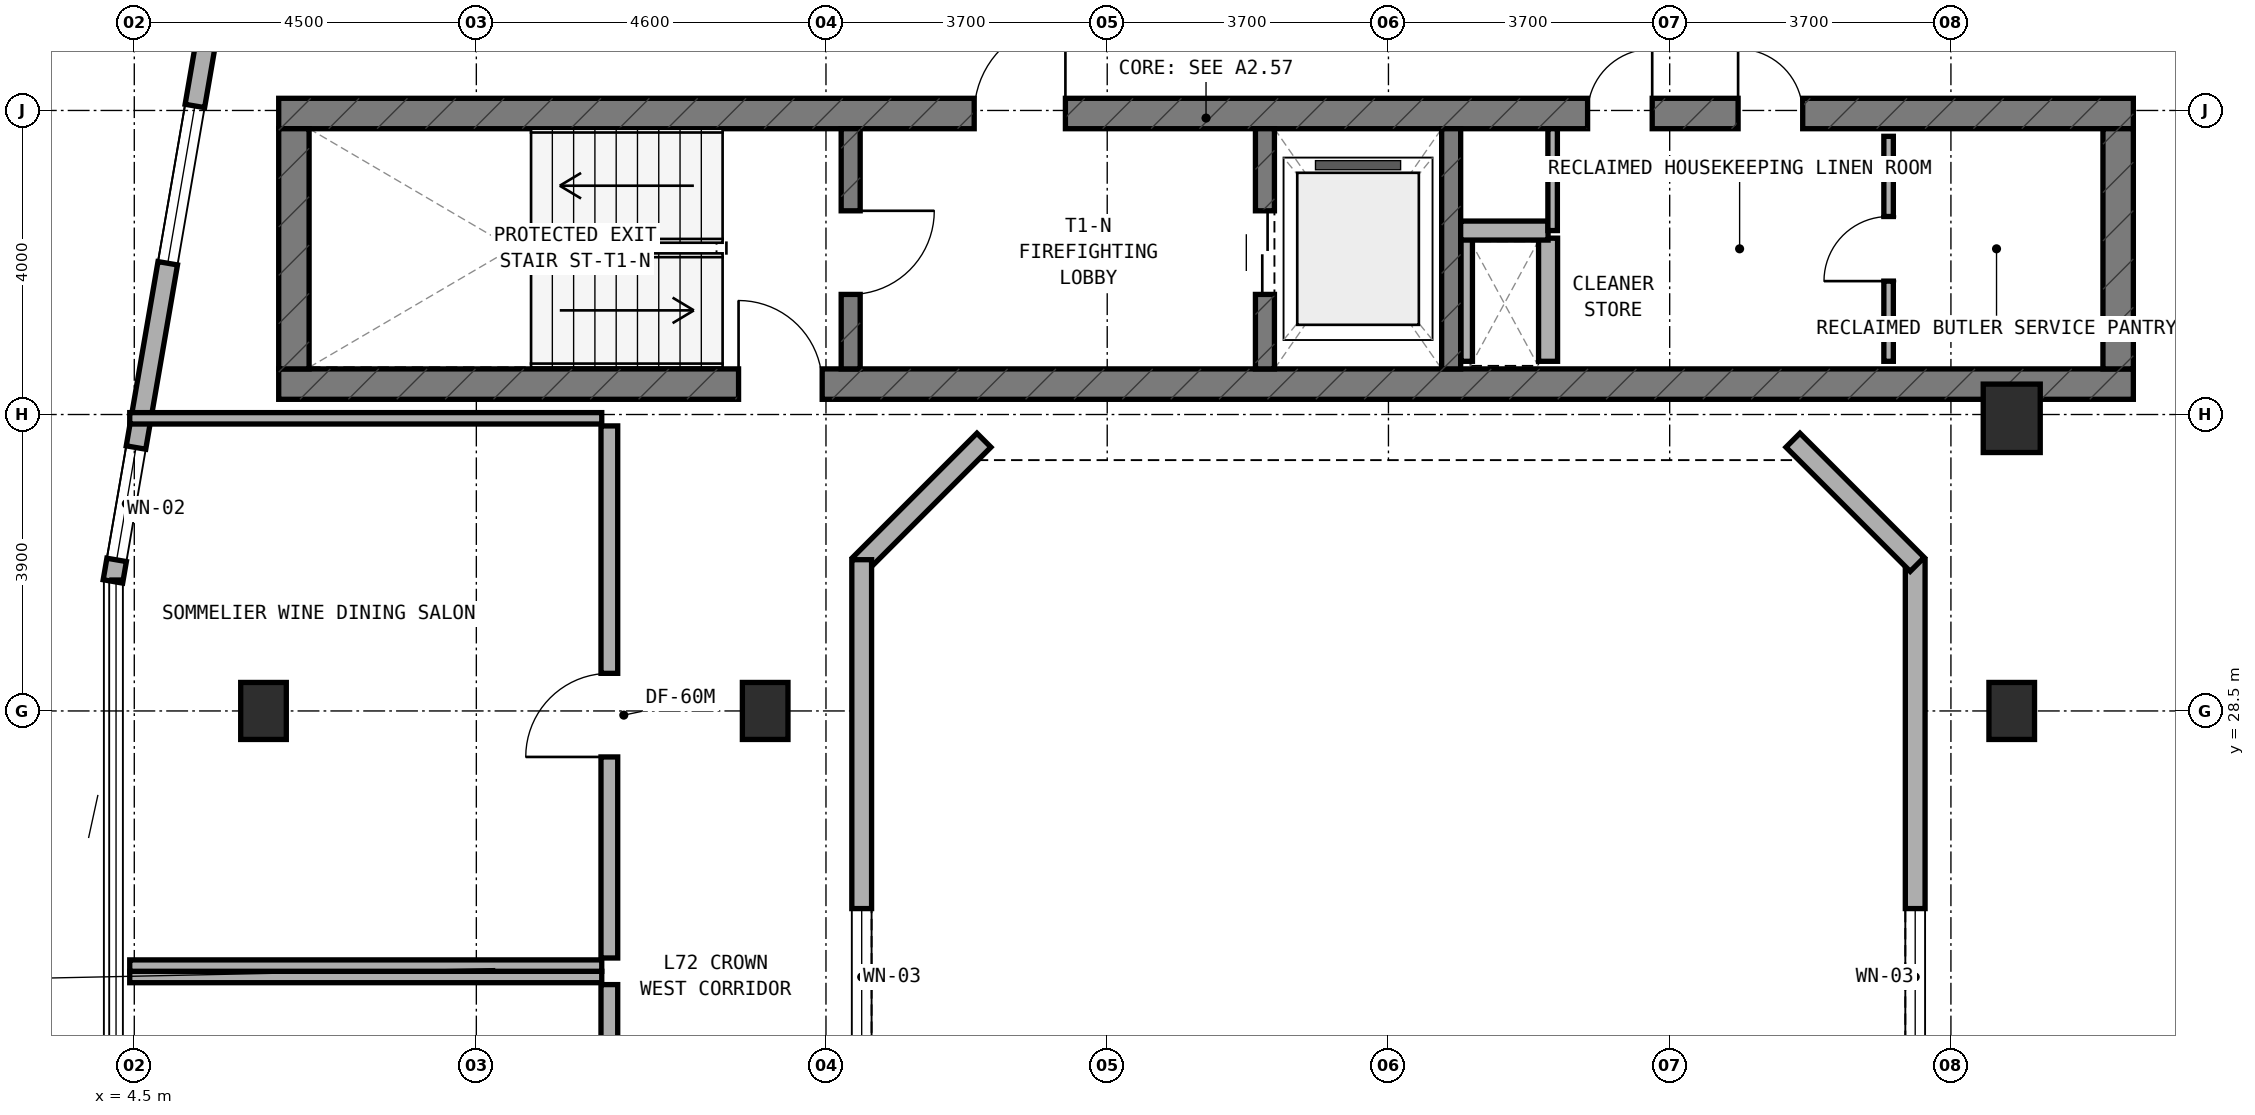
"""IFC4 building model, lengths in metres.
Left out: names, types, materials, properties, quantities, classifications, styles, units other than length and angle.
Written with IfcOpenShell. Run it as: python <this file> out.ifc"""

import sys

from ifc_helpers import new_model, si_unit, direction, frame, frame_2d, origin, origin_2d, place, context, subcontext, project, spatial, rectangle, extrude, element, fill, save


model = new_model("IFC4")
c1 = context("Model", 3, precision=1e-05, world=origin(), true_north=direction((0.0, 1.0)))
c2 = subcontext(c1, "Body", "Model", "MODEL_VIEW")
j1 = project(units=[si_unit("LENGTHUNIT", "METRE"), si_unit("PLANEANGLEUNIT", "RADIAN")], contexts=[c1])
p1 = place(None, origin())
s1 = spatial("IfcSite", under=j1, at=p1, CompositionType="ELEMENT")
p2 = place(p1, origin())
s2 = spatial("IfcBuilding", under=s1, at=p2, CompositionType="ELEMENT")
p3 = place(p2, frame((0.0, 0.0, 264.8)))
s3 = spatial("IfcBuildingStorey", under=s2, at=p3, CompositionType="ELEMENT", Elevation=264.8)
p4 = place(p3, frame((6.4, 32.8, 0.0), z_axis=(0.0, 0.0, 1.0), x_axis=(1.0, 0.0, 0.0)))
e1 = element("IfcWall", 1, at=p4, inside=s3, PredefinedType="SHEAR", context=c2, shape_type="SweptSolid", body=[
    extrude(rectangle(XDim=24.4, YDim=0.4, at=frame_2d((12.2, 0.0))), origin(), (0.0, 0.0, 1.0), 3.6),
])
p5 = place(p4, frame((6.05, 0.0, 0.0)))
e2 = element("IfcOpeningElement", 2, at=p5, cuts=e1, PredefinedType="OPENING", context=c2, shape_type="SweptSolid", body=[
    extrude(rectangle(XDim=1.1, YDim=2.15, at=frame_2d((0.55, 1.075))), frame((0.0, 0.21, 0.0), z_axis=(0.0, -1.0, 0.0), x_axis=(1.0, 0.0, 0.0)), (0.0, 0.0, 1.0), 0.42),
])
p6 = place(p3, frame((6.4, 36.36, 0.0), z_axis=(0.0, 0.0, 1.0), x_axis=(1.0, 0.0, 0.0)))
e3 = element("IfcWall", 3, at=p6, inside=s3, PredefinedType="SHEAR", context=c2, shape_type="SweptSolid", body=[
    extrude(rectangle(XDim=24.4, YDim=0.4, at=frame_2d((12.2, 0.0))), origin(), (0.0, 0.0, 1.0), 3.6),
])
p7 = place(p6, frame((9.15, 0.0, 0.0)))
e4 = element("IfcOpeningElement", 4, at=p7, cuts=e3, PredefinedType="OPENING", context=c2, shape_type="SweptSolid", body=[
    extrude(rectangle(XDim=1.2, YDim=2.15, at=frame_2d((0.6, 1.075))), frame((0.0, 0.21, 0.0), z_axis=(0.0, -1.0, 0.0), x_axis=(1.0, 0.0, 0.0)), (0.0, 0.0, 1.0), 0.42),
])
p8 = place(p6, frame((19.2, 0.0, 0.0)))
e5 = element("IfcOpeningElement", 5, at=p8, cuts=e3, PredefinedType="OPENING", context=c2, shape_type="SweptSolid", body=[
    extrude(rectangle(XDim=0.85, YDim=2.1, at=frame_2d((0.425, 1.05))), frame((0.0, 0.21, 0.0), z_axis=(0.0, -1.0, 0.0), x_axis=(1.0, 0.0, 0.0)), (0.0, 0.0, 1.0), 0.42),
])
p9 = place(p6, frame((17.22, 0.0, 0.0)))
e6 = element("IfcOpeningElement", 6, at=p9, cuts=e3, PredefinedType="OPENING", context=c2, shape_type="SweptSolid", body=[
    extrude(rectangle(XDim=0.85, YDim=2.1, at=frame_2d((0.425, 1.05))), frame((0.0, 0.21, 0.0), z_axis=(0.0, -1.0, 0.0), x_axis=(1.0, 0.0, 0.0)), (0.0, 0.0, 1.0), 0.42),
])
for number, where, z_axis, x_axis in (
    (7, (6.6, 33.0, 0.0), (0.0, 0.0, 1.0), (0.0, 1.0, 0.0)),
    (8, (30.6, 33.0, 0.0), (0.0, 0.0, 1.0), (0.0, 1.0, 0.0)),
):
    element("IfcWall", number, at=place(p3, frame(where, z_axis=z_axis, x_axis=x_axis)), inside=s3, PredefinedType="SHEAR", context=c2, shape_type="SweptSolid", body=[
        extrude(rectangle(XDim=3.16, YDim=0.4, at=frame_2d((1.58, 0.0))), origin(), (0.0, 0.0, 1.0), 3.6),
    ])
p10 = place(p3, frame((13.925, 33.0, 0.0), z_axis=(0.0, 0.0, 1.0), x_axis=(0.0, 1.0, 0.0)))
e9 = element("IfcWall", 9, at=p10, inside=s3, PredefinedType="STANDARD", context=c2, shape_type="SweptSolid", body=[
    extrude(rectangle(XDim=3.16, YDim=0.25, at=frame_2d((1.58, 0.0))), origin(), (0.0, 0.0, 1.0), 3.32),
])
p11 = place(p10, frame((0.98, 0.0, 0.0)))
e10 = element("IfcOpeningElement", 10, at=p11, cuts=e9, PredefinedType="OPENING", context=c2, shape_type="SweptSolid", body=[
    extrude(rectangle(XDim=1.1, YDim=2.15, at=frame_2d((0.55, 1.075))), frame((0.0, 0.135, 0.0), z_axis=(0.0, -1.0, 0.0), x_axis=(1.0, 0.0, 0.0)), (0.0, 0.0, 1.0), 0.27),
])
p12 = place(p3, frame((19.375, 33.0, 0.0), z_axis=(0.0, 0.0, 1.0), x_axis=(0.0, 1.0, 0.0)))
e11 = element("IfcWall", 11, at=p12, inside=s3, PredefinedType="STANDARD", context=c2, shape_type="SweptSolid", body=[
    extrude(rectangle(XDim=3.16, YDim=0.25, at=frame_2d((1.58, 0.0))), origin(), (0.0, 0.0, 1.0), 3.32),
])
p13 = place(p12, frame((0.98, 0.0, 0.0)))
e12 = element("IfcOpeningElement", 12, at=p13, cuts=e11, PredefinedType="OPENING", context=c2, shape_type="SweptSolid", body=[
    extrude(rectangle(XDim=1.1, YDim=2.15, at=frame_2d((0.55, 1.075))), frame((0.0, 0.135, 0.0), z_axis=(0.0, -1.0, 0.0), x_axis=(1.0, 0.0, 0.0)), (0.0, 0.0, 1.0), 0.27),
])
p14 = place(p3, frame((21.825, 33.0, 0.0), z_axis=(0.0, 0.0, 1.0), x_axis=(0.0, 1.0, 0.0)))
e13 = element("IfcWall", 13, at=p14, inside=s3, PredefinedType="STANDARD", context=c2, shape_type="SweptSolid", body=[
    extrude(rectangle(XDim=3.16, YDim=0.25, at=frame_2d((1.58, 0.0))), origin(), (0.0, 0.0, 1.0), 3.32),
])
for number, where, z_axis, x_axis in (
    (14, (6.2, 28.5, 0.0), (0.0, 0.0, 1.0), (1.0, 0.0, 0.0)),
    (15, (12.8, 28.5, 0.0), (0.0, 0.0, 1.0), (1.0, 0.0, 0.0)),
):
    element("IfcColumn", number, at=place(p3, frame(where, z_axis=z_axis, x_axis=x_axis)), inside=s3, PredefinedType="COLUMN", context=c2, shape_type="SweptSolid", body=[
        extrude(rectangle(XDim=0.6, YDim=0.75, at=origin_2d()), origin(), (0.0, 0.0, 1.0), 3.6),
    ])
p15 = place(p3, frame((29.2, 32.35, 0.0), z_axis=(0.0, 0.0, 1.0), x_axis=(1.0, 0.0, 0.0)))
e16 = element("IfcColumn", 16, at=p15, inside=s3, PredefinedType="COLUMN", context=c2, shape_type="SweptSolid", body=[
    extrude(rectangle(XDim=0.75, YDim=0.9, at=origin_2d()), origin(), (0.0, 0.0, 1.0), 3.6),
])
p16 = place(p3, frame((29.2, 28.5, 0.0), z_axis=(0.0, 0.0, 1.0), x_axis=(1.0, 0.0, 0.0)))
e17 = element("IfcColumn", 17, at=p16, inside=s3, PredefinedType="COLUMN", context=c2, shape_type="SweptSolid", body=[
    extrude(rectangle(XDim=0.6, YDim=0.75, at=origin_2d()), origin(), (0.0, 0.0, 1.0), 3.6),
])
p17 = place(p3, frame((5.629, 38.386, 0.0), z_axis=(0.0, 0.0, 1.0), x_axis=(-0.169818291056, -0.985475391891, 0.0)))
e18 = element("IfcWall", 18, at=p17, inside=s3, PredefinedType="STANDARD", context=c2, shape_type="SweptSolid", body=[
    extrude(rectangle(XDim=8.302, YDim=0.26, at=frame_2d((4.151, 0.0))), origin(), (0.0, 0.0, 1.0), 3.32),
])
p18 = place(p17, frame((1.955, 0.0, 0.85)))
e19 = element("IfcOpeningElement", 19, at=p18, cuts=e18, PredefinedType="OPENING", context=c2, shape_type="SweptSolid", body=[
    extrude(rectangle(XDim=2.1, YDim=1.5, at=frame_2d((1.05, 0.75))), frame((0.0, 0.14, 0.0), z_axis=(0.0, -1.0, 0.0), x_axis=(1.0, 0.0, 0.0)), (0.0, 0.0, 1.0), 0.28),
])
p19 = place(p17, frame((6.515, 0.0, 0.85)))
e20 = element("IfcOpeningElement", 20, at=p19, cuts=e18, PredefinedType="OPENING", context=c2, shape_type="SweptSolid", body=[
    extrude(rectangle(XDim=1.5, YDim=1.5, at=frame_2d((0.75, 0.75))), frame((0.0, 0.14, 0.0), z_axis=(0.0, -1.0, 0.0), x_axis=(1.0, 0.0, 0.0)), (0.0, 0.0, 1.0), 0.28),
])
p20 = place(p3, frame((27.93, 19.51, 0.0), z_axis=(0.0, 0.0, 1.0), x_axis=(0.0, 1.0, 0.0)))
e21 = element("IfcWall", 21, at=p20, inside=s3, PredefinedType="STANDARD", context=c2, shape_type="SweptSolid", body=[
    extrude(rectangle(XDim=10.98, YDim=0.26, at=frame_2d((5.49, 0.0))), origin(), (0.0, 0.0, 1.0), 3.32),
])
p21 = place(p20, frame((4.59, 0.0, 0.85)))
e22 = element("IfcOpeningElement", 22, at=p21, cuts=e21, PredefinedType="OPENING", context=c2, shape_type="SweptSolid", body=[
    extrude(rectangle(XDim=1.8, YDim=1.5, at=frame_2d((0.9, 0.75))), frame((0.0, 0.14, 0.0), z_axis=(0.0, -1.0, 0.0), x_axis=(1.0, 0.0, 0.0)), (0.0, 0.0, 1.0), 0.28),
])
for number, where, z_axis, x_axis in (
    (23, (27.956, 30.428, 0.0), (0.0, 0.0, 1.0), (-0.707, 0.707, 0.0)),
    (24, (15.678, 32.062, 0.0), (0.0, 0.0, 1.0), (-0.707, -0.707, 0.0)),
):
    element("IfcWall", number, at=place(p3, frame(where, z_axis=z_axis, x_axis=x_axis)), inside=s3, PredefinedType="STANDARD", context=c2, shape_type="SweptSolid", body=[
        extrude(rectangle(XDim=2.311, YDim=0.26, at=frame_2d((1.155, 0.0))), origin(), (0.0, 0.0, 1.0), 3.32),
    ])
p22 = place(p3, frame((14.07, 30.49, 0.0), z_axis=(0.0, 0.0, 1.0), x_axis=(0.0, -1.0, 0.0)))
e25 = element("IfcWall", 25, at=p22, inside=s3, PredefinedType="STANDARD", context=c2, shape_type="SweptSolid", body=[
    extrude(rectangle(XDim=10.98, YDim=0.26, at=frame_2d((5.49, 0.0))), origin(), (0.0, 0.0, 1.0), 3.32),
])
p23 = place(p22, frame((4.59, 0.0, 0.85)))
e26 = element("IfcOpeningElement", 26, at=p23, cuts=e25, PredefinedType="OPENING", context=c2, shape_type="SweptSolid", body=[
    extrude(rectangle(XDim=1.8, YDim=1.5, at=frame_2d((0.9, 0.75))), frame((0.0, 0.14, 0.0), z_axis=(0.0, -1.0, 0.0), x_axis=(1.0, 0.0, 0.0)), (0.0, 0.0, 1.0), 0.28),
])
p24 = place(p3, frame((27.58, 33.1, 0.0), z_axis=(0.0, 0.0, 1.0), x_axis=(0.0, 1.0, 0.0)))
e27 = element("IfcWall", 27, at=p24, inside=s3, PredefinedType="PARTITIONING", context=c2, shape_type="SweptSolid", body=[
    extrude(rectangle(XDim=2.96, YDim=0.125, at=frame_2d((1.48, 0.0))), origin(), (0.0, 0.0, 1.0), 3.32),
])
p25 = place(p24, frame((1.055, 0.0, 0.0)))
e28 = element("IfcOpeningElement", 28, at=p25, cuts=e27, PredefinedType="OPENING", context=c2, shape_type="SweptSolid", body=[
    extrude(rectangle(XDim=0.85, YDim=2.1, at=frame_2d((0.425, 1.05))), frame((0.0, 0.073, 0.0), z_axis=(0.0, -1.0, 0.0), x_axis=(1.0, 0.0, 0.0)), (0.0, 0.0, 1.0), 0.145),
])
p26 = place(p3, frame((22.03, 33.1, 0.0), z_axis=(0.0, 0.0, 1.0), x_axis=(0.0, 1.0, 0.0)))
e29 = element("IfcWall", 29, at=p26, inside=s3, PredefinedType="PARTITIONING", context=c2, shape_type="SweptSolid", body=[
    extrude(rectangle(XDim=1.62, YDim=0.15, at=frame_2d((0.81, 0.0))), origin(), (0.0, 0.0, 1.0), 3.32),
])
p27 = place(p3, frame((23.1, 33.1, 0.0), z_axis=(0.0, 0.0, 1.0), x_axis=(0.0, 1.0, 0.0)))
e30 = element("IfcWall", 30, at=p27, inside=s3, PredefinedType="SOLIDWALL", context=c2, shape_type="SweptSolid", body=[
    extrude(rectangle(XDim=1.62, YDim=0.25, at=frame_2d((0.81, 0.0))), origin(), (0.0, 0.0, 1.0), 3.32),
])
p28 = place(p3, frame((21.95, 34.82, 0.0), z_axis=(0.0, 0.0, 1.0), x_axis=(1.0, 0.0, 0.0)))
e31 = element("IfcWall", 31, at=p28, inside=s3, PredefinedType="SOLIDWALL", context=c2, shape_type="SweptSolid", body=[
    extrude(rectangle(XDim=1.15, YDim=0.25, at=frame_2d((0.575, 0.0))), origin(), (0.0, 0.0, 1.0), 3.32),
])
p29 = place(p3, frame((23.16, 34.82, 0.0), z_axis=(0.0, 0.0, 1.0), x_axis=(0.0, 1.0, 0.0)))
e32 = element("IfcWall", 32, at=p29, inside=s3, PredefinedType="PARTITIONING", context=c2, shape_type="SweptSolid", body=[
    extrude(rectangle(XDim=1.34, YDim=0.125, at=frame_2d((0.67, 0.0))), origin(), (0.0, 0.0, 1.0), 3.32),
])
p30 = place(p3, frame((4.44, 25.0, 0.0), z_axis=(0.0, 0.0, 1.0), x_axis=(1.0, 0.0, 0.0)))
e33 = element("IfcWall", 33, at=p30, inside=s3, PredefinedType="PARTITIONING", context=c2, shape_type="SweptSolid", body=[
    extrude(rectangle(XDim=6.21, YDim=0.15, at=frame_2d((3.105, 0.0))), origin(), (0.0, 0.0, 1.0), 3.015),
])
p31 = place(p3, frame((10.75, 17.75, 0.0), z_axis=(0.0, 0.0, 1.0), x_axis=(0.0, 1.0, 0.0)))
e34 = element("IfcWall", 34, at=p31, inside=s3, PredefinedType="SOLIDWALL", context=c2, shape_type="SweptSolid", body=[
    extrude(rectangle(XDim=7.15, YDim=0.22, at=frame_2d((3.575, 0.0))), origin(), (0.0, 0.0, 1.0), 2.795),
])
p32 = place(p31, frame((2.713, 0.0, 0.0)))
e35 = element("IfcOpeningElement", 35, at=p32, cuts=e34, PredefinedType="OPENING", context=c2, shape_type="SweptSolid", body=[
    extrude(rectangle(XDim=1.1, YDim=2.1, at=frame_2d((0.55, 1.05))), frame((0.0, 0.12, 0.0), z_axis=(0.0, -1.0, 0.0), x_axis=(1.0, 0.0, 0.0)), (0.0, 0.0, 1.0), 0.24),
])
p33 = place(p3, frame((4.44, 25.15, 0.0), z_axis=(0.0, 0.0, 1.0), x_axis=(1.0, 0.0, 0.0)))
e36 = element("IfcWall", 36, at=p33, inside=s3, PredefinedType="PARTITIONING", context=c2, shape_type="SweptSolid", body=[
    extrude(rectangle(XDim=6.21, YDim=0.15, at=frame_2d((3.105, 0.0))), origin(), (0.0, 0.0, 1.0), 3.015),
])
p34 = place(p3, frame((4.44, 32.35, 0.0), z_axis=(0.0, 0.0, 1.0), x_axis=(1.0, 0.0, 0.0)))
e37 = element("IfcWall", 37, at=p34, inside=s3, PredefinedType="PARTITIONING", context=c2, shape_type="SweptSolid", body=[
    extrude(rectangle(XDim=6.21, YDim=0.15, at=frame_2d((3.105, 0.0))), origin(), (0.0, 0.0, 1.0), 3.32),
])
p35 = place(p3, frame((10.75, 25.25, 0.0), z_axis=(0.0, 0.0, 1.0), x_axis=(0.0, 1.0, 0.0)))
e38 = element("IfcWall", 38, at=p35, inside=s3, PredefinedType="SOLIDWALL", context=c2, shape_type="SweptSolid", body=[
    extrude(rectangle(XDim=7.0, YDim=0.22, at=frame_2d((3.5, 0.0))), origin(), (0.0, 0.0, 1.0), 2.795),
])
p36 = place(p35, frame((2.645, 0.0, 0.0)))
e39 = element("IfcOpeningElement", 39, at=p36, cuts=e38, PredefinedType="OPENING", context=c2, shape_type="SweptSolid", body=[
    extrude(rectangle(XDim=1.1, YDim=2.1, at=frame_2d((0.55, 1.05))), frame((0.0, 0.12, 0.0), z_axis=(0.0, -1.0, 0.0), x_axis=(1.0, 0.0, 0.0)), (0.0, 0.0, 1.0), 0.24),
])
p37 = place(p18, origin())
e40 = element("IfcWindow", 40, at=p37, inside=s3, PartitioningType="SINGLE_PANEL", PredefinedType="WINDOW", context=c2, shape_type="SweptSolid", body=[
    extrude(rectangle(XDim=2.1, YDim=1.5, at=frame_2d((1.05, 0.75))), frame((0.0, 0.03, 0.0), z_axis=(0.0, -1.0, 0.0), x_axis=(1.0, 0.0, 0.0)), (0.0, 0.0, 1.0), 0.06),
])
fill(e19, e40)
p38 = place(p19, origin())
e41 = element("IfcWindow", 41, at=p38, inside=s3, PartitioningType="SINGLE_PANEL", PredefinedType="WINDOW", context=c2, shape_type="SweptSolid", body=[
    extrude(rectangle(XDim=1.5, YDim=1.5, at=frame_2d((0.75, 0.75))), frame((0.0, 0.03, 0.0), z_axis=(0.0, -1.0, 0.0), x_axis=(1.0, 0.0, 0.0)), (0.0, 0.0, 1.0), 0.06),
])
fill(e20, e41)
p39 = place(p21, origin())
e42 = element("IfcWindow", 42, at=p39, inside=s3, PartitioningType="SINGLE_PANEL", PredefinedType="WINDOW", context=c2, shape_type="SweptSolid", body=[
    extrude(rectangle(XDim=1.8, YDim=1.5, at=frame_2d((0.9, 0.75))), frame((0.0, 0.03, 0.0), z_axis=(0.0, -1.0, 0.0), x_axis=(1.0, 0.0, 0.0)), (0.0, 0.0, 1.0), 0.06),
])
fill(e22, e42)
p40 = place(p23, origin())
e43 = element("IfcWindow", 43, at=p40, inside=s3, PartitioningType="SINGLE_PANEL", PredefinedType="WINDOW", context=c2, shape_type="SweptSolid", body=[
    extrude(rectangle(XDim=1.8, YDim=1.5, at=frame_2d((0.9, 0.75))), frame((0.0, 0.03, 0.0), z_axis=(0.0, -1.0, 0.0), x_axis=(1.0, 0.0, 0.0)), (0.0, 0.0, 1.0), 0.06),
])
fill(e26, e43)
p41 = place(p11, frame((1.1, 0.0, 0.0), z_axis=(0.0, 0.0, 1.0), x_axis=(-1.0, 0.0, 0.0)))
e44 = element("IfcDoor", 44, at=p41, inside=s3, OperationType="SINGLE_SWING_LEFT", PredefinedType="DOOR", context=c2, shape_type="SweptSolid", body=[
    extrude(rectangle(XDim=1.1, YDim=2.15, at=frame_2d((0.55, 1.075))), frame((0.0, 0.025, 0.0), z_axis=(0.0, -1.0, 0.0), x_axis=(1.0, 0.0, 0.0)), (0.0, 0.0, 1.0), 0.05),
])
fill(e10, e44)
p42 = place(p7, origin())
e45 = element("IfcDoor", 45, at=p42, inside=s3, OperationType="SINGLE_SWING_RIGHT", PredefinedType="DOOR", context=c2, shape_type="SweptSolid", body=[
    extrude(rectangle(XDim=1.2, YDim=2.15, at=frame_2d((0.6, 1.075))), frame((0.0, 0.025, 0.0), z_axis=(0.0, -1.0, 0.0), x_axis=(1.0, 0.0, 0.0)), (0.0, 0.0, 1.0), 0.05),
])
fill(e4, e45)
p43 = place(p13, origin())
e46 = element("IfcDoor", 46, at=p43, inside=s3, OperationType="DOUBLE_DOOR_SLIDING", PredefinedType="DOOR", context=c2, shape_type="SweptSolid", body=[
    extrude(rectangle(XDim=1.1, YDim=2.15, at=frame_2d((0.55, 1.075))), frame((0.0, 0.025, 0.0), z_axis=(0.0, -1.0, 0.0), x_axis=(1.0, 0.0, 0.0)), (0.0, 0.0, 1.0), 0.05),
])
fill(e12, e46)
p44 = place(p8, origin())
e47 = element("IfcDoor", 47, at=p44, inside=s3, OperationType="SINGLE_SWING_LEFT", PredefinedType="DOOR", context=c2, shape_type="SweptSolid", body=[
    extrude(rectangle(XDim=0.85, YDim=2.1, at=frame_2d((0.425, 1.05))), frame((0.0, 0.025, 0.0), z_axis=(0.0, -1.0, 0.0), x_axis=(1.0, 0.0, 0.0)), (0.0, 0.0, 1.0), 0.05),
])
fill(e5, e47)
p45 = place(p9, origin())
e48 = element("IfcDoor", 48, at=p45, inside=s3, OperationType="SINGLE_SWING_RIGHT", PredefinedType="DOOR", context=c2, shape_type="SweptSolid", body=[
    extrude(rectangle(XDim=0.85, YDim=2.1, at=frame_2d((0.425, 1.05))), frame((0.0, 0.025, 0.0), z_axis=(0.0, -1.0, 0.0), x_axis=(1.0, 0.0, 0.0)), (0.0, 0.0, 1.0), 0.05),
])
fill(e6, e48)
p46 = place(p5, origin())
e49 = element("IfcDoor", 49, at=p46, inside=s3, OperationType="SINGLE_SWING_LEFT", PredefinedType="DOOR", context=c2, shape_type="SweptSolid", body=[
    extrude(rectangle(XDim=1.1, YDim=2.15, at=frame_2d((0.55, 1.075))), frame((0.0, 0.025, 0.0), z_axis=(0.0, -1.0, 0.0), x_axis=(1.0, 0.0, 0.0)), (0.0, 0.0, 1.0), 0.05),
])
fill(e2, e49)
p47 = place(p25, origin())
e50 = element("IfcDoor", 50, at=p47, inside=s3, OperationType="SINGLE_SWING_LEFT", PredefinedType="DOOR", context=c2, shape_type="SweptSolid", body=[
    extrude(rectangle(XDim=0.85, YDim=2.1, at=frame_2d((0.425, 1.05))), frame((0.0, 0.025, 0.0), z_axis=(0.0, -1.0, 0.0), x_axis=(1.0, 0.0, 0.0)), (0.0, 0.0, 1.0), 0.05),
])
fill(e28, e50)
p48 = place(p36, origin())
e51 = element("IfcDoor", 51, at=p48, inside=s3, OperationType="SINGLE_SWING_LEFT", PredefinedType="DOOR", context=c2, shape_type="SweptSolid", body=[
    extrude(rectangle(XDim=1.1, YDim=2.1, at=frame_2d((0.55, 1.05))), frame((0.0, 0.025, 0.0), z_axis=(0.0, -1.0, 0.0), x_axis=(1.0, 0.0, 0.0)), (0.0, 0.0, 1.0), 0.05),
])
fill(e39, e51)
save(model, sys.argv[1])
